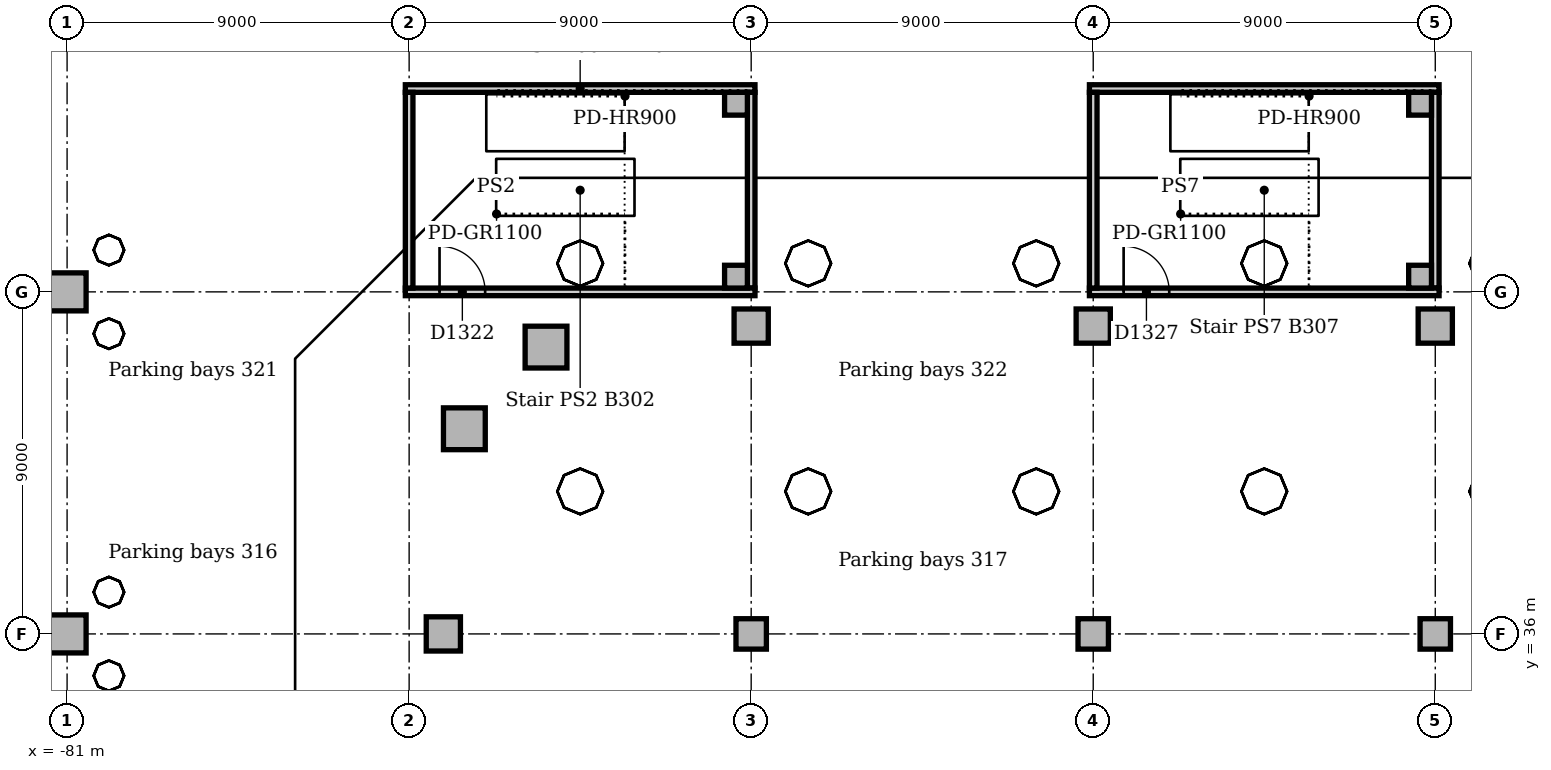
"""IFC4 building model, lengths in metres.
Left out: names, types, materials, properties, quantities, classifications, styles, units other than length and angle.
Written with IfcOpenShell. Run it as: python <this file> out.ifc"""

import sys

from ifc_helpers import new_model, si_unit, direction, frame, frame_2d, origin, origin_2d, place, context, subcontext, project, spatial, rectangle, extrude, element, fill, save


model = new_model("IFC4")
c1 = context("Model", 3, precision=1e-05, world=origin(), true_north=direction((0.0, 1.0)))
c2 = subcontext(c1, "Body", "Model", "MODEL_VIEW")
j1 = project(units=[si_unit("LENGTHUNIT", "METRE"), si_unit("PLANEANGLEUNIT", "RADIAN")], contexts=[c1])
p1 = place(None, origin())
s1 = spatial("IfcSite", under=j1, at=p1, CompositionType="ELEMENT")
p2 = place(p1, origin())
s2 = spatial("IfcBuilding", under=s1, at=p2, CompositionType="ELEMENT")
p3 = place(p2, frame((0.0, 0.0, -14.0)))
s3 = spatial("IfcBuildingStorey", under=s2, at=p3, CompositionType="ELEMENT", Elevation=-14.0)
for number, where, z_axis, x_axis in (
    (1, (-68.398, 43.547, 0.0), (0.0, 0.0, 1.0), (1.0, 0.0, 0.0)),
    (2, (-70.547, 41.398, 0.0), (0.0, 0.0, 1.0), (1.0, 0.0, 0.0)),
):
    element("IfcColumn", number, at=place(p3, frame(where, z_axis=z_axis, x_axis=x_axis)), inside=s3, PredefinedType="COLUMN", context=c2, shape_type="SweptSolid", body=[
        extrude(rectangle(XDim=1.1, YDim=1.1, at=origin_2d()), origin(), (0.0, 0.0, 1.0), 4.15),
    ])
for number, where, z_axis, x_axis in (
    (3, (-63.0, 44.1, 0.0), (0.0, 0.0, 1.0), (1.0, 0.0, 0.0)),
    (4, (-54.0, 44.1, 0.0), (0.0, 0.0, 1.0), (1.0, 0.0, 0.0)),
    (5, (-45.0, 44.1, 0.0), (0.0, 0.0, 1.0), (1.0, 0.0, 0.0)),
    (6, (-71.1, 36.0, 0.0), (0.0, 0.0, 1.0), (1.0, 0.0, 0.0)),
):
    element("IfcColumn", number, at=place(p3, frame(where, z_axis=z_axis, x_axis=x_axis)), inside=s3, PredefinedType="COLUMN", context=c2, shape_type="SweptSolid", body=[
        extrude(rectangle(XDim=0.9, YDim=0.9, at=origin_2d()), origin(), (0.0, 0.0, 1.0), 4.15),
    ])
for number, where, z_axis, x_axis in (
    (7, (-63.0, 36.0, 0.0), (0.0, 0.0, 1.0), (1.0, 0.0, 0.0)),
    (8, (-54.0, 36.0, 0.0), (0.0, 0.0, 1.0), (1.0, 0.0, 0.0)),
    (9, (-45.0, 36.0, 0.0), (0.0, 0.0, 1.0), (1.0, 0.0, 0.0)),
):
    element("IfcColumn", number, at=place(p3, frame(where, z_axis=z_axis, x_axis=x_axis)), inside=s3, PredefinedType="COLUMN", context=c2, shape_type="SweptSolid", body=[
        extrude(rectangle(XDim=0.8, YDim=0.8, at=origin_2d()), origin(), (0.0, 0.0, 1.0), 4.15),
    ])
for number, where, z_axis, x_axis in (
    (10, (-81.0, 36.0, 0.0), (0.0, 0.0, 1.0), (1.0, 0.0, 0.0)),
    (11, (-81.0, 45.0, 0.0), (0.0, 0.0, 1.0), (1.0, 0.0, 0.0)),
):
    element("IfcColumn", number, at=place(p3, frame(where, z_axis=z_axis, x_axis=x_axis)), inside=s3, PredefinedType="COLUMN", context=c2, shape_type="SweptSolid", body=[
        extrude(rectangle(XDim=1.0, YDim=1.0, at=origin_2d()), origin(), (0.0, 0.0, 1.0), 4.15),
    ])
for number, where, z_axis, x_axis in (
    (12, (-63.4, 49.95, 0.0), (0.0, 0.0, 1.0), (1.0, 0.0, 0.0)),
    (13, (-63.4, 45.4, 0.0), (0.0, 0.0, 1.0), (1.0, 0.0, 0.0)),
    (14, (-45.4, 49.95, 0.0), (0.0, 0.0, 1.0), (1.0, 0.0, 0.0)),
    (15, (-45.4, 45.4, 0.0), (0.0, 0.0, 1.0), (1.0, 0.0, 0.0)),
):
    element("IfcColumn", number, at=place(p3, frame(where, z_axis=z_axis, x_axis=x_axis)), inside=s3, PredefinedType="COLUMN", context=c2, shape_type="SweptSolid", body=[
        extrude(rectangle(XDim=0.6, YDim=0.6, at=origin_2d()), origin(), (0.0, 0.0, 1.0), 4.5),
    ])
p4 = place(p3, frame((-72.1, 50.35, 0.0), z_axis=(0.0, 0.0, 1.0), x_axis=(1.0, 0.0, 0.0)))
e16 = element("IfcWall", 16, at=p4, inside=s3, PredefinedType="SOLIDWALL", context=c2, shape_type="SweptSolid", body=[
    extrude(rectangle(XDim=9.2, YDim=0.2, at=frame_2d((4.6, 0.0))), origin(), (0.0, 0.0, 1.0), 4.15),
])
p5 = place(p3, frame((-63.0, 45.1, 0.0), z_axis=(0.0, 0.0, 1.0), x_axis=(0.0, 1.0, 0.0)))
e17 = element("IfcWall", 17, at=p5, inside=s3, PredefinedType="SOLIDWALL", context=c2, shape_type="SweptSolid", body=[
    extrude(rectangle(XDim=5.15, YDim=0.2, at=frame_2d((2.575, 0.0))), origin(), (0.0, 0.0, 1.0), 4.15),
])
p6 = place(p3, frame((-72.1, 45.0, 0.0), z_axis=(0.0, 0.0, 1.0), x_axis=(1.0, 0.0, 0.0)))
e18 = element("IfcWall", 18, at=p6, inside=s3, PredefinedType="SOLIDWALL", context=c2, shape_type="SweptSolid", body=[
    extrude(rectangle(XDim=9.2, YDim=0.2, at=frame_2d((4.6, 0.0))), origin(), (0.0, 0.0, 1.0), 4.15),
])
p7 = place(p6, frame((0.9, 0.0, 0.0)))
e19 = element("IfcOpeningElement", 19, at=p7, cuts=e18, PredefinedType="OPENING", context=c2, shape_type="SweptSolid", body=[
    extrude(rectangle(XDim=1.2, YDim=2.1, at=frame_2d((0.6, 1.05))), frame((0.0, 0.11, 0.0), z_axis=(0.0, -1.0, 0.0), x_axis=(1.0, 0.0, 0.0)), (0.0, 0.0, 1.0), 0.22),
])
p8 = place(p3, frame((-72.0, 45.1, 0.0), z_axis=(0.0, 0.0, 1.0), x_axis=(0.0, 1.0, 0.0)))
e20 = element("IfcWall", 20, at=p8, inside=s3, PredefinedType="SOLIDWALL", context=c2, shape_type="SweptSolid", body=[
    extrude(rectangle(XDim=5.15, YDim=0.2, at=frame_2d((2.575, 0.0))), origin(), (0.0, 0.0, 1.0), 4.15),
])
p9 = place(p3, frame((-54.1, 50.35, 0.0), z_axis=(0.0, 0.0, 1.0), x_axis=(1.0, 0.0, 0.0)))
e21 = element("IfcWall", 21, at=p9, inside=s3, PredefinedType="SOLIDWALL", context=c2, shape_type="SweptSolid", body=[
    extrude(rectangle(XDim=9.2, YDim=0.2, at=frame_2d((4.6, 0.0))), origin(), (0.0, 0.0, 1.0), 4.15),
])
p10 = place(p3, frame((-45.0, 45.1, 0.0), z_axis=(0.0, 0.0, 1.0), x_axis=(0.0, 1.0, 0.0)))
e22 = element("IfcWall", 22, at=p10, inside=s3, PredefinedType="SOLIDWALL", context=c2, shape_type="SweptSolid", body=[
    extrude(rectangle(XDim=5.15, YDim=0.2, at=frame_2d((2.575, 0.0))), origin(), (0.0, 0.0, 1.0), 4.15),
])
p11 = place(p3, frame((-54.1, 45.0, 0.0), z_axis=(0.0, 0.0, 1.0), x_axis=(1.0, 0.0, 0.0)))
e23 = element("IfcWall", 23, at=p11, inside=s3, PredefinedType="SOLIDWALL", context=c2, shape_type="SweptSolid", body=[
    extrude(rectangle(XDim=9.2, YDim=0.2, at=frame_2d((4.6, 0.0))), origin(), (0.0, 0.0, 1.0), 4.15),
])
p12 = place(p11, frame((0.9, 0.0, 0.0)))
e24 = element("IfcOpeningElement", 24, at=p12, cuts=e23, PredefinedType="OPENING", context=c2, shape_type="SweptSolid", body=[
    extrude(rectangle(XDim=1.2, YDim=2.1, at=frame_2d((0.6, 1.05))), frame((0.0, 0.11, 0.0), z_axis=(0.0, -1.0, 0.0), x_axis=(1.0, 0.0, 0.0)), (0.0, 0.0, 1.0), 0.22),
])
p13 = place(p3, frame((-54.0, 45.1, 0.0), z_axis=(0.0, 0.0, 1.0), x_axis=(0.0, 1.0, 0.0)))
e25 = element("IfcWall", 25, at=p13, inside=s3, PredefinedType="SOLIDWALL", context=c2, shape_type="SweptSolid", body=[
    extrude(rectangle(XDim=5.15, YDim=0.2, at=frame_2d((2.575, 0.0))), origin(), (0.0, 0.0, 1.0), 4.15),
])
p14 = place(p7, origin())
e26 = element("IfcDoor", 26, at=p14, inside=s3, OperationType="SINGLE_SWING_LEFT", PredefinedType="DOOR", context=c2, shape_type="SweptSolid", body=[
    extrude(rectangle(XDim=1.2, YDim=2.1, at=frame_2d((0.6, 1.05))), frame((0.0, 0.025, 0.0), z_axis=(0.0, -1.0, 0.0), x_axis=(1.0, 0.0, 0.0)), (0.0, 0.0, 1.0), 0.05),
])
fill(e19, e26)
p15 = place(p12, origin())
e27 = element("IfcDoor", 27, at=p15, inside=s3, OperationType="SINGLE_SWING_LEFT", PredefinedType="DOOR", context=c2, shape_type="SweptSolid", body=[
    extrude(rectangle(XDim=1.2, YDim=2.1, at=frame_2d((0.6, 1.05))), frame((0.0, 0.025, 0.0), z_axis=(0.0, -1.0, 0.0), x_axis=(1.0, 0.0, 0.0)), (0.0, 0.0, 1.0), 0.05),
])
fill(e24, e27)
save(model, sys.argv[1])
